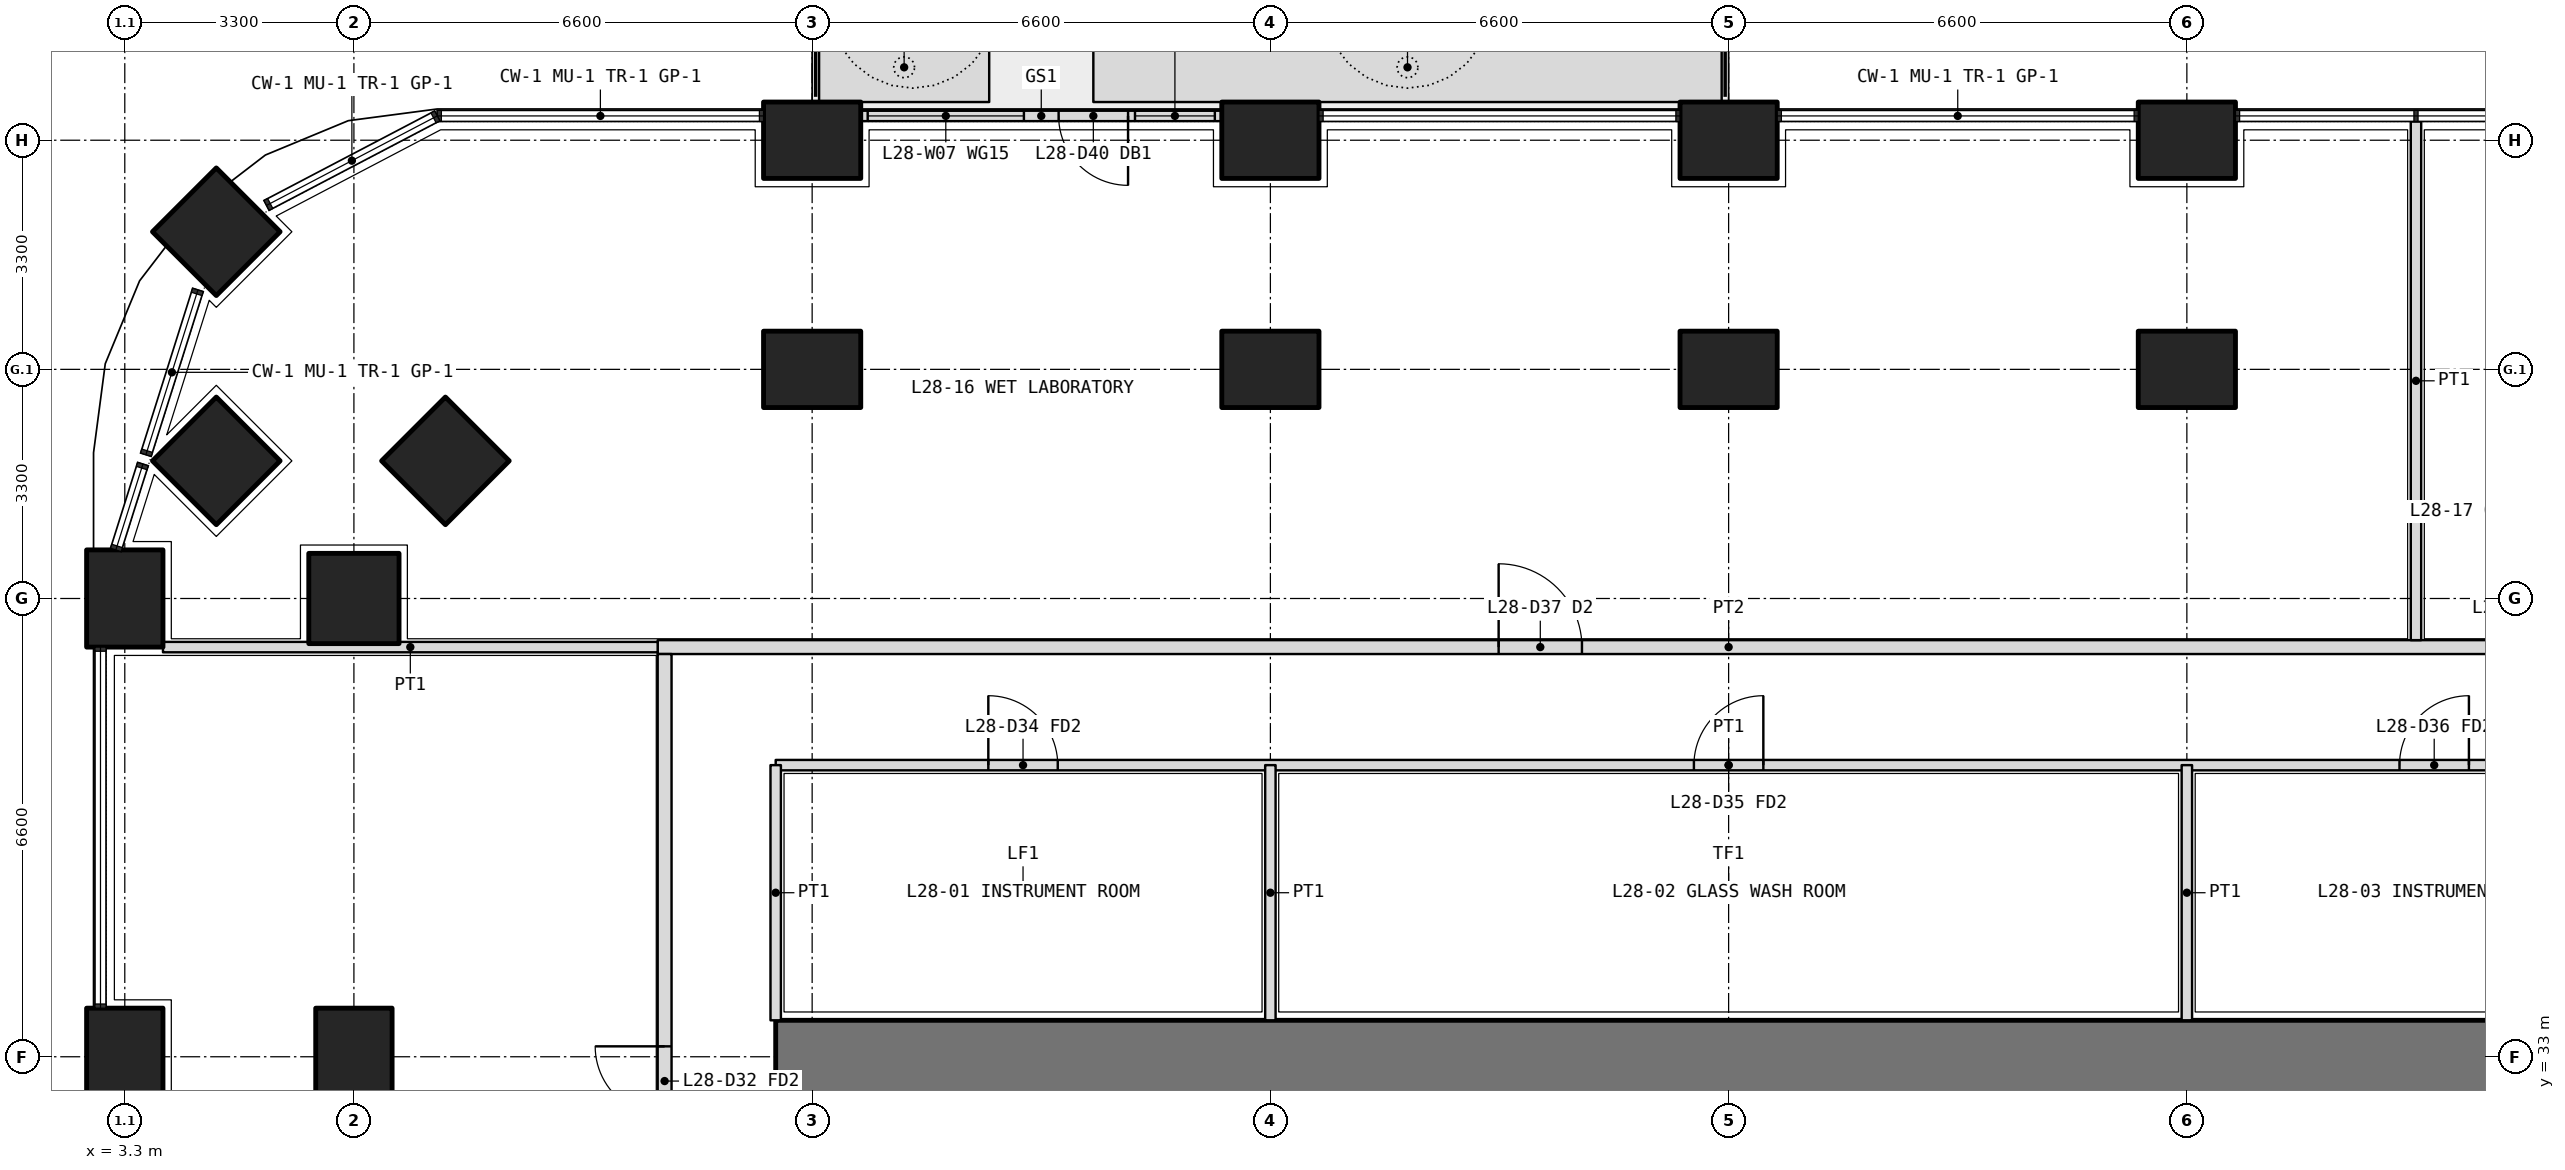
"""IFC4 building model, lengths in metres.
Left out: names, types, materials, properties, quantities, classifications, styles, units other than length and angle.
Written with IfcOpenShell. Run it as: python <this file> out.ifc"""

import sys

from ifc_helpers import new_model, si_unit, direction, frame, frame_2d, origin, origin_2d, place, context, subcontext, project, spatial, polyline, rectangle, outline, extrude, element, fill, save


model = new_model("IFC4")
c1 = context("Model", 3, precision=1e-05, world=origin(), true_north=direction((0.0, 1.0)))
c2 = subcontext(c1, "Body", "Model", "MODEL_VIEW")
j1 = project(units=[si_unit("LENGTHUNIT", "METRE"), si_unit("PLANEANGLEUNIT", "RADIAN")], contexts=[c1])
p1 = place(None, origin())
s1 = spatial("IfcSite", under=j1, at=p1, CompositionType="ELEMENT")
p2 = place(p1, origin())
s2 = spatial("IfcBuilding", under=s1, at=p2, CompositionType="ELEMENT")
p3 = place(p2, frame((0.0, 0.0, 124.2)))
s3 = spatial("IfcBuildingStorey", under=s2, at=p3, CompositionType="ELEMENT", Elevation=124.2)
p4 = place(p3, frame((4.618, 44.882, 0.0), z_axis=(0.0, 0.0, 1.0), x_axis=(0.707106781187, 0.707106781187, 0.0)))
e1 = element("IfcColumn", 1, at=p4, inside=s3, PredefinedType="COLUMN", context=c2, shape_type="SweptSolid", body=[
    extrude(rectangle(XDim=1.3, YDim=1.3, at=origin_2d()), origin(), (0.0, 0.0, 1.0), 4.2),
])
for number, where, z_axis, x_axis in (
    (2, (3.3, 33.0, 0.0), (0.0, 0.0, 1.0), (0.0, 1.0, 0.0)),
    (3, (3.3, 39.6, 0.0), (0.0, 0.0, 1.0), (0.0, 1.0, 0.0)),
    (4, (13.2, 46.2, 0.0), (0.0, 0.0, 1.0), (1.0, 0.0, 0.0)),
    (5, (19.8, 46.2, 0.0), (0.0, 0.0, 1.0), (1.0, 0.0, 0.0)),
    (6, (26.4, 46.2, 0.0), (0.0, 0.0, 1.0), (1.0, 0.0, 0.0)),
    (7, (33.0, 46.2, 0.0), (0.0, 0.0, 1.0), (1.0, 0.0, 0.0)),
):
    element("IfcColumn", number, at=place(p3, frame(where, z_axis=z_axis, x_axis=x_axis)), inside=s3, PredefinedType="COLUMN", context=c2, shape_type="SweptSolid", body=[
        extrude(rectangle(XDim=1.4, YDim=1.1, at=origin_2d()), origin(), (0.0, 0.0, 1.0), 4.2),
    ])
for number, where, z_axis, x_axis in (
    (8, (6.6, 39.6, 0.0), (0.0, 0.0, 1.0), (1.0, 0.0, 0.0)),
    (9, (4.618, 41.582, 0.0), (0.0, 0.0, 1.0), (0.707, 0.707, 0.0)),
):
    element("IfcColumn", number, at=place(p3, frame(where, z_axis=z_axis, x_axis=x_axis)), inside=s3, PredefinedType="COLUMN", context=c2, shape_type="SweptSolid", body=[
        extrude(rectangle(XDim=1.3, YDim=1.3, at=origin_2d()), origin(), (0.0, 0.0, 1.0), 4.2),
    ])
for number, where, z_axis, x_axis in (
    (10, (13.2, 42.9, 0.0), (0.0, 0.0, 1.0), (1.0, 0.0, 0.0)),
    (11, (19.8, 42.9, 0.0), (0.0, 0.0, 1.0), (1.0, 0.0, 0.0)),
    (12, (26.4, 42.9, 0.0), (0.0, 0.0, 1.0), (1.0, 0.0, 0.0)),
    (13, (33.0, 42.9, 0.0), (0.0, 0.0, 1.0), (1.0, 0.0, 0.0)),
):
    element("IfcColumn", number, at=place(p3, frame(where, z_axis=z_axis, x_axis=x_axis)), inside=s3, PredefinedType="COLUMN", context=c2, shape_type="SweptSolid", body=[
        extrude(rectangle(XDim=1.4, YDim=1.1, at=origin_2d()), origin(), (0.0, 0.0, 1.0), 4.2),
    ])
p5 = place(p3, frame((7.918, 41.582, 0.0), z_axis=(0.0, 0.0, 1.0), x_axis=(0.707106781187, 0.707106781187, 0.0)))
e14 = element("IfcColumn", 14, at=p5, inside=s3, PredefinedType="COLUMN", context=c2, shape_type="SweptSolid", body=[
    extrude(rectangle(XDim=1.3, YDim=1.3, at=origin_2d()), origin(), (0.0, 0.0, 1.0), 4.2),
])
p6 = place(p3, frame((6.6, 33.0, 0.0), z_axis=(0.0, 0.0, 1.0), x_axis=(0.0, 1.0, 0.0)))
e15 = element("IfcColumn", 15, at=p6, inside=s3, PredefinedType="COLUMN", context=c2, shape_type="SweptSolid", body=[
    extrude(rectangle(XDim=1.4, YDim=1.1, at=origin_2d()), origin(), (0.0, 0.0, 1.0), 4.2),
])
p7 = place(p3, origin())
e16 = element("IfcWall", 16, at=p7, inside=s3, PredefinedType="USERDEFINED", context=c2, shape_type="SweptSolid", body=[
    extrude(outline(polyline([(13.3, 46.75), (15.75, 46.75), (15.75, 47.75), (13.3, 47.75), (13.3, 46.75)]), holes=[polyline([(13.45, 46.9), (15.6, 46.9), (15.6, 47.6), (13.45, 47.6), (13.45, 46.9)])]), origin(), (0.0, 0.0, 1.0), 1.05),
])
p8 = place(p3, origin())
e17 = element("IfcWall", 17, at=p8, inside=s3, PredefinedType="USERDEFINED", context=c2, shape_type="SweptSolid", body=[
    extrude(outline(polyline([(17.25, 46.75), (26.3, 46.75), (26.3, 47.75), (17.25, 47.75), (17.25, 46.75)]), holes=[polyline([(17.4, 46.9), (26.15, 46.9), (26.15, 47.6), (17.4, 47.6), (17.4, 46.9)])]), origin(), (0.0, 0.0, 1.0), 1.05),
])
p9 = place(p3, frame((19.1, 46.55, 0.0), z_axis=(0.0, 0.0, 1.0), x_axis=(-1.0, 0.0, 0.0)))
e18 = element("IfcWall", 18, at=p9, inside=s3, PredefinedType="SOLIDWALL", context=c2, shape_type="SweptSolid", body=[
    extrude(rectangle(XDim=5.2, YDim=0.15, at=frame_2d((2.6, 0.0))), origin(), (0.0, 0.0, 1.0), 2.7),
])
p10 = place(p9, frame((1.35, 0.0, 0.0)))
e19 = element("IfcOpeningElement", 19, at=p10, cuts=e18, PredefinedType="OPENING", context=c2, shape_type="SweptSolid", body=[
    extrude(rectangle(XDim=1.0, YDim=2.4, at=frame_2d((0.5, 1.2))), frame((0.0, 0.085, 0.0), z_axis=(0.0, -1.0, 0.0), x_axis=(1.0, 0.0, 0.0)), (0.0, 0.0, 1.0), 0.17),
])
p11 = place(p9, frame((0.1, 0.0, 0.1)))
e20 = element("IfcOpeningElement", 20, at=p11, cuts=e18, PredefinedType="OPENING", context=c2, shape_type="SweptSolid", body=[
    extrude(rectangle(XDim=1.15, YDim=2.3, at=frame_2d((0.575, 1.15))), frame((0.0, 0.085, 0.0), z_axis=(0.0, -1.0, 0.0), x_axis=(1.0, 0.0, 0.0)), (0.0, 0.0, 1.0), 0.17),
])
p12 = place(p9, frame((2.85, 0.0, 0.1)))
e21 = element("IfcOpeningElement", 21, at=p12, cuts=e18, PredefinedType="OPENING", context=c2, shape_type="SweptSolid", body=[
    extrude(rectangle(XDim=2.25, YDim=2.3, at=frame_2d((1.125, 1.15))), frame((0.0, 0.085, 0.0), z_axis=(0.0, -1.0, 0.0), x_axis=(1.0, 0.0, 0.0)), (0.0, 0.0, 1.0), 0.17),
])
p13 = place(p3, frame((40.125, 33.0, 0.0), z_axis=(0.0, 0.0, 1.0), x_axis=(-1.0, 0.0, 0.0)))
e22 = element("IfcWall", 22, at=p13, inside=s3, PredefinedType="SHEAR", context=c2, shape_type="SweptSolid", body=[
    extrude(rectangle(XDim=27.45, YDim=1.05, at=frame_2d((13.725, 0.0))), origin(), (0.0, 0.0, 1.0), 4.2),
])
p14 = place(p3, frame((12.675, 37.2, 0.0), z_axis=(0.0, 0.0, 1.0), x_axis=(1.0, 0.0, 0.0)))
e23 = element("IfcWall", 23, at=p14, inside=s3, PredefinedType="PARTITIONING", context=c2, shape_type="SweptSolid", body=[
    extrude(rectangle(XDim=27.45, YDim=0.15, at=frame_2d((13.725, 0.0))), origin(), (0.0, 0.0, 1.0), 2.85),
])
p15 = place(p14, frame((3.062, 0.0, 0.0)))
e24 = element("IfcOpeningElement", 24, at=p15, cuts=e23, PredefinedType="OPENING", context=c2, shape_type="SweptSolid", body=[
    extrude(rectangle(XDim=1.0, YDim=2.1, at=frame_2d((0.5, 1.05))), frame((0.0, 0.085, 0.0), z_axis=(0.0, -1.0, 0.0), x_axis=(1.0, 0.0, 0.0)), (0.0, 0.0, 1.0), 0.17),
])
p16 = place(p14, frame((13.225, 0.0, 0.0)))
e25 = element("IfcOpeningElement", 25, at=p16, cuts=e23, PredefinedType="OPENING", context=c2, shape_type="SweptSolid", body=[
    extrude(rectangle(XDim=1.0, YDim=2.1, at=frame_2d((0.5, 1.05))), frame((0.0, 0.085, 0.0), z_axis=(0.0, -1.0, 0.0), x_axis=(1.0, 0.0, 0.0)), (0.0, 0.0, 1.0), 0.17),
])
p17 = place(p14, frame((23.387, 0.0, 0.0)))
e26 = element("IfcOpeningElement", 26, at=p17, cuts=e23, PredefinedType="OPENING", context=c2, shape_type="SweptSolid", body=[
    extrude(rectangle(XDim=1.0, YDim=2.1, at=frame_2d((0.5, 1.05))), frame((0.0, 0.085, 0.0), z_axis=(0.0, -1.0, 0.0), x_axis=(1.0, 0.0, 0.0)), (0.0, 0.0, 1.0), 0.17),
])
for number, where, z_axis, x_axis in (
    (27, (12.675, 33.525, 0.0), (0.0, 0.0, 1.0), (0.0, 1.0, 0.0)),
    (28, (19.8, 33.525, 0.0), (0.0, 0.0, 1.0), (0.0, 1.0, 0.0)),
    (29, (33.0, 33.525, 0.0), (0.0, 0.0, 1.0), (0.0, 1.0, 0.0)),
):
    element("IfcWall", number, at=place(p3, frame(where, z_axis=z_axis, x_axis=x_axis)), inside=s3, PredefinedType="PARTITIONING", context=c2, shape_type="SweptSolid", body=[
        extrude(rectangle(XDim=3.675, YDim=0.15, at=frame_2d((1.837, 0.0))), origin(), (0.0, 0.0, 1.0), 2.85),
    ])
p18 = place(p3, frame((10.975, 38.9, 0.0), z_axis=(0.0, 0.0, 1.0), x_axis=(1.0, 0.0, 0.0)))
e30 = element("IfcWall", 30, at=p18, inside=s3, PredefinedType="PARTITIONING", context=c2, shape_type="SweptSolid", body=[
    extrude(rectangle(XDim=30.85, YDim=0.2, at=frame_2d((15.425, 0.0))), origin(), (0.0, 0.0, 1.0), 2.85),
])
p19 = place(p18, frame((12.113, 0.0, 0.0)))
e31 = element("IfcOpeningElement", 31, at=p19, cuts=e30, PredefinedType="OPENING", context=c2, shape_type="SweptSolid", body=[
    extrude(rectangle(XDim=1.2, YDim=2.1, at=frame_2d((0.6, 1.05))), frame((0.0, 0.11, 0.0), z_axis=(0.0, -1.0, 0.0), x_axis=(1.0, 0.0, 0.0)), (0.0, 0.0, 1.0), 0.22),
])
p20 = place(p18, frame((26.475, 0.0, 0.0)))
e32 = element("IfcOpeningElement", 32, at=p20, cuts=e30, PredefinedType="OPENING", context=c2, shape_type="SweptSolid", body=[
    extrude(rectangle(XDim=1.0, YDim=2.1, at=frame_2d((0.5, 1.05))), frame((0.0, 0.11, 0.0), z_axis=(0.0, -1.0, 0.0), x_axis=(1.0, 0.0, 0.0)), (0.0, 0.0, 1.0), 0.22),
])
p21 = place(p18, frame((29.188, 0.0, 0.0)))
e33 = element("IfcOpeningElement", 33, at=p21, cuts=e30, PredefinedType="OPENING", context=c2, shape_type="SweptSolid", body=[
    extrude(rectangle(XDim=1.0, YDim=2.1, at=frame_2d((0.5, 1.05))), frame((0.0, 0.11, 0.0), z_axis=(0.0, -1.0, 0.0), x_axis=(1.0, 0.0, 0.0)), (0.0, 0.0, 1.0), 0.22),
])
p22 = place(p3, frame((11.075, 11.175, 0.0), z_axis=(0.0, 0.0, 1.0), x_axis=(0.0, 1.0, 0.0)))
e34 = element("IfcWall", 34, at=p22, inside=s3, PredefinedType="PARTITIONING", context=c2, shape_type="SweptSolid", body=[
    extrude(rectangle(XDim=27.625, YDim=0.2, at=frame_2d((13.812, 0.0))), origin(), (0.0, 0.0, 1.0), 2.85),
])
p23 = place(p22, frame((0.462, 0.0, 0.0)))
e35 = element("IfcOpeningElement", 35, at=p23, cuts=e34, PredefinedType="OPENING", context=c2, shape_type="SweptSolid", body=[
    extrude(rectangle(XDim=1.0, YDim=2.1, at=frame_2d((0.5, 1.05))), frame((0.0, 0.11, 0.0), z_axis=(0.0, -1.0, 0.0), x_axis=(1.0, 0.0, 0.0)), (0.0, 0.0, 1.0), 0.22),
])
p24 = place(p22, frame((2.575, 0.0, 0.0)))
e36 = element("IfcOpeningElement", 36, at=p24, cuts=e34, PredefinedType="OPENING", context=c2, shape_type="SweptSolid", body=[
    extrude(rectangle(XDim=1.0, YDim=2.1, at=frame_2d((0.5, 1.05))), frame((0.0, 0.11, 0.0), z_axis=(0.0, -1.0, 0.0), x_axis=(1.0, 0.0, 0.0)), (0.0, 0.0, 1.0), 0.22),
])
p25 = place(p22, frame((5.625, 0.0, 0.0)))
e37 = element("IfcOpeningElement", 37, at=p25, cuts=e34, PredefinedType="OPENING", context=c2, shape_type="SweptSolid", body=[
    extrude(rectangle(XDim=0.9, YDim=2.1, at=frame_2d((0.45, 1.05))), frame((0.0, 0.11, 0.0), z_axis=(0.0, -1.0, 0.0), x_axis=(1.0, 0.0, 0.0)), (0.0, 0.0, 1.0), 0.22),
])
p26 = place(p22, frame((9.425, 0.0, 0.0)))
e38 = element("IfcOpeningElement", 38, at=p26, cuts=e34, PredefinedType="OPENING", context=c2, shape_type="SweptSolid", body=[
    extrude(rectangle(XDim=0.9, YDim=2.1, at=frame_2d((0.45, 1.05))), frame((0.0, 0.11, 0.0), z_axis=(0.0, -1.0, 0.0), x_axis=(1.0, 0.0, 0.0)), (0.0, 0.0, 1.0), 0.22),
])
p27 = place(p22, frame((12.975, 0.0, 0.0)))
e39 = element("IfcOpeningElement", 39, at=p27, cuts=e34, PredefinedType="OPENING", context=c2, shape_type="SweptSolid", body=[
    extrude(rectangle(XDim=1.0, YDim=2.1, at=frame_2d((0.5, 1.05))), frame((0.0, 0.11, 0.0), z_axis=(0.0, -1.0, 0.0), x_axis=(1.0, 0.0, 0.0)), (0.0, 0.0, 1.0), 0.22),
])
p28 = place(p22, frame((20.975, 0.0, 0.0)))
e40 = element("IfcOpeningElement", 40, at=p28, cuts=e34, PredefinedType="OPENING", context=c2, shape_type="SweptSolid", body=[
    extrude(rectangle(XDim=1.0, YDim=2.1, at=frame_2d((0.5, 1.05))), frame((0.0, 0.11, 0.0), z_axis=(0.0, -1.0, 0.0), x_axis=(1.0, 0.0, 0.0)), (0.0, 0.0, 1.0), 0.22),
])
p29 = place(p3, frame((3.85, 38.9, 0.0), z_axis=(0.0, 0.0, 1.0), x_axis=(1.0, 0.0, 0.0)))
e41 = element("IfcWall", 41, at=p29, inside=s3, PredefinedType="PARTITIONING", context=c2, shape_type="SweptSolid", body=[
    extrude(rectangle(XDim=7.125, YDim=0.15, at=frame_2d((3.562, 0.0))), origin(), (0.0, 0.0, 1.0), 2.85),
])
p30 = place(p3, frame((36.3, 46.47, 0.0), z_axis=(0.0, 0.0, 1.0), x_axis=(0.0, -1.0, 0.0)))
e42 = element("IfcWall", 42, at=p30, inside=s3, PredefinedType="PARTITIONING", context=c2, shape_type="SweptSolid", body=[
    extrude(rectangle(XDim=7.47, YDim=0.15, at=frame_2d((3.735, 0.0))), origin(), (0.0, 0.0, 1.0), 2.7),
])
p31 = place(p10, origin())
e43 = element("IfcDoor", 43, at=p31, inside=s3, OperationType="SINGLE_SWING_LEFT", PredefinedType="DOOR", context=c2, shape_type="SweptSolid", body=[
    extrude(rectangle(XDim=1.0, YDim=2.4, at=frame_2d((0.5, 1.2))), frame((0.0, 0.025, 0.0), z_axis=(0.0, -1.0, 0.0), x_axis=(1.0, 0.0, 0.0)), (0.0, 0.0, 1.0), 0.05),
])
fill(e19, e43)
p32 = place(p11, origin())
e44 = element("IfcWindow", 44, at=p32, inside=s3, PartitioningType="SINGLE_PANEL", PredefinedType="WINDOW", context=c2, shape_type="SweptSolid", body=[
    extrude(rectangle(XDim=1.15, YDim=2.3, at=frame_2d((0.575, 1.15))), frame((0.0, 0.03, 0.0), z_axis=(0.0, -1.0, 0.0), x_axis=(1.0, 0.0, 0.0)), (0.0, 0.0, 1.0), 0.06),
])
fill(e20, e44)
p33 = place(p12, origin())
e45 = element("IfcWindow", 45, at=p33, inside=s3, PartitioningType="SINGLE_PANEL", PredefinedType="WINDOW", context=c2, shape_type="SweptSolid", body=[
    extrude(rectangle(XDim=2.25, YDim=2.3, at=frame_2d((1.125, 1.15))), frame((0.0, 0.03, 0.0), z_axis=(0.0, -1.0, 0.0), x_axis=(1.0, 0.0, 0.0)), (0.0, 0.0, 1.0), 0.06),
])
fill(e21, e45)
p34 = place(p15, origin())
e46 = element("IfcDoor", 46, at=p34, inside=s3, OperationType="SINGLE_SWING_LEFT", PredefinedType="DOOR", context=c2, shape_type="SweptSolid", body=[
    extrude(rectangle(XDim=1.0, YDim=2.1, at=frame_2d((0.5, 1.05))), frame((0.0, 0.025, 0.0), z_axis=(0.0, -1.0, 0.0), x_axis=(1.0, 0.0, 0.0)), (0.0, 0.0, 1.0), 0.05),
])
fill(e24, e46)
p35 = place(p16, origin())
e47 = element("IfcDoor", 47, at=p35, inside=s3, OperationType="SINGLE_SWING_RIGHT", PredefinedType="DOOR", context=c2, shape_type="SweptSolid", body=[
    extrude(rectangle(XDim=1.0, YDim=2.1, at=frame_2d((0.5, 1.05))), frame((0.0, 0.025, 0.0), z_axis=(0.0, -1.0, 0.0), x_axis=(1.0, 0.0, 0.0)), (0.0, 0.0, 1.0), 0.05),
])
fill(e25, e47)
p36 = place(p17, origin())
e48 = element("IfcDoor", 48, at=p36, inside=s3, OperationType="SINGLE_SWING_RIGHT", PredefinedType="DOOR", context=c2, shape_type="SweptSolid", body=[
    extrude(rectangle(XDim=1.0, YDim=2.1, at=frame_2d((0.5, 1.05))), frame((0.0, 0.025, 0.0), z_axis=(0.0, -1.0, 0.0), x_axis=(1.0, 0.0, 0.0)), (0.0, 0.0, 1.0), 0.05),
])
fill(e26, e48)
p37 = place(p19, origin())
e49 = element("IfcDoor", 49, at=p37, inside=s3, OperationType="DOUBLE_DOOR_SINGLE_SWING", PredefinedType="DOOR", context=c2, shape_type="SweptSolid", body=[
    extrude(rectangle(XDim=1.2, YDim=2.1, at=frame_2d((0.6, 1.05))), frame((0.0, 0.025, 0.0), z_axis=(0.0, -1.0, 0.0), x_axis=(1.0, 0.0, 0.0)), (0.0, 0.0, 1.0), 0.05),
])
fill(e31, e49)
p38 = place(p28, origin())
e50 = element("IfcDoor", 50, at=p38, inside=s3, OperationType="SINGLE_SWING_RIGHT", PredefinedType="DOOR", context=c2, shape_type="SweptSolid", body=[
    extrude(rectangle(XDim=1.0, YDim=2.1, at=frame_2d((0.5, 1.05))), frame((0.0, 0.025, 0.0), z_axis=(0.0, -1.0, 0.0), x_axis=(1.0, 0.0, 0.0)), (0.0, 0.0, 1.0), 0.05),
])
fill(e40, e50)
save(model, sys.argv[1])
